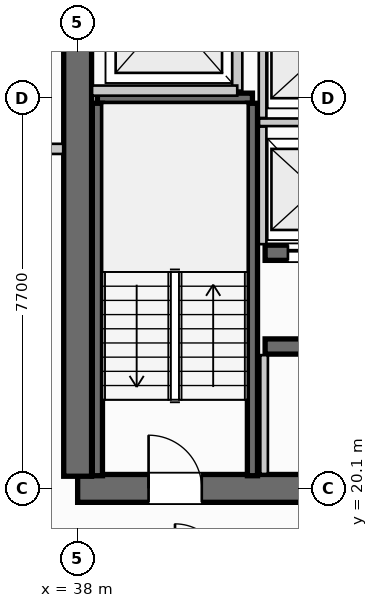
"""IFC4 building model, lengths in metres.
Left out: names, types, materials, properties, quantities, classifications, styles, units other than length and angle.
Written with IfcOpenShell. Run it as: python <this file> out.ifc"""

import sys

from ifc_helpers import new_model, si_unit, direction, frame, frame_2d, origin, place, context, subcontext, project, spatial, rectangle, extrude, source, transform, mapped, element, fill, save


model = new_model("IFC4")
c1 = context("Model", 3, precision=1e-05, world=origin(), true_north=direction((0.0, 1.0)))
c2 = subcontext(c1, "Body", "Model", "MODEL_VIEW")
j1 = project(units=[si_unit("LENGTHUNIT", "METRE"), si_unit("PLANEANGLEUNIT", "RADIAN")], contexts=[c1])
p1 = place(None, origin())
s1 = spatial("IfcSite", under=j1, at=p1, CompositionType="ELEMENT")
p2 = place(p1, origin())
s2 = spatial("IfcBuilding", under=s1, at=p2, CompositionType="ELEMENT")
p3 = place(p2, frame((0.0, 0.0, 214.9)))
s3 = spatial("IfcBuildingStorey", under=s2, at=p3, CompositionType="ELEMENT", Elevation=214.9)
p4 = place(p3, frame((38.0, 20.1, 0.0), z_axis=(0.0, 0.0, 1.0), x_axis=(1.0, 0.0, 0.0)))
e1 = element("IfcWall", 1, at=p4, inside=s3, PredefinedType="SHEAR", context=c2, shape_type="SweptSolid", body=[
    extrude(rectangle(XDim=17.6, YDim=0.55, at=frame_2d((8.8, 0.0))), origin(), (0.0, 0.0, 1.0), 3.24),
])
p5 = place(p4, frame((1.4, 0.0, 0.0)))
e2 = element("IfcOpeningElement", 2, at=p5, cuts=e1, PredefinedType="OPENING", context=c2, shape_type="SweptSolid", body=[
    extrude(rectangle(XDim=1.05, YDim=2.15, at=frame_2d((0.525, 1.075))), frame((0.0, 0.285, 0.0), z_axis=(0.0, -1.0, 0.0), x_axis=(1.0, 0.0, 0.0)), (0.0, 0.0, 1.0), 0.57),
])
p6 = place(p4, frame((15.15, 0.0, 0.0)))
e3 = element("IfcOpeningElement", 3, at=p6, cuts=e1, PredefinedType="OPENING", context=c2, shape_type="SweptSolid", body=[
    extrude(rectangle(XDim=1.05, YDim=2.15, at=frame_2d((0.525, 1.075))), frame((0.0, 0.285, 0.0), z_axis=(0.0, -1.0, 0.0), x_axis=(1.0, 0.0, 0.0)), (0.0, 0.0, 1.0), 0.57),
])
p7 = place(p4, frame((5.25, 0.0, 0.0)))
e4 = element("IfcOpeningElement", 4, at=p7, cuts=e1, PredefinedType="OPENING", context=c2, shape_type="SweptSolid", body=[
    extrude(rectangle(XDim=0.9, YDim=2.15, at=frame_2d((0.45, 1.075))), frame((0.0, 0.285, 0.0), z_axis=(0.0, -1.0, 0.0), x_axis=(1.0, 0.0, 0.0)), (0.0, 0.0, 1.0), 0.57),
])
p8 = place(p4, frame((11.4, 0.0, 0.0)))
e5 = element("IfcOpeningElement", 5, at=p8, cuts=e1, PredefinedType="OPENING", context=c2, shape_type="SweptSolid", body=[
    extrude(rectangle(XDim=0.95, YDim=2.15, at=frame_2d((0.475, 1.075))), frame((0.0, 0.285, 0.0), z_axis=(0.0, -1.0, 0.0), x_axis=(1.0, 0.0, 0.0)), (0.0, 0.0, 1.0), 0.57),
])
p9 = place(p3, frame((38.0, 35.26, 0.0), z_axis=(0.0, 0.0, 1.0), x_axis=(0.0, -1.0, 0.0)))
e6 = element("IfcWall", 6, at=p9, inside=s3, PredefinedType="SHEAR", context=c2, shape_type="SweptSolid", body=[
    extrude(rectangle(XDim=14.92, YDim=0.55, at=frame_2d((7.46, 0.0))), origin(), (0.0, 0.0, 1.0), 3.24),
])
p10 = place(p9, frame((5.21, 0.0, 0.0)))
e7 = element("IfcOpeningElement", 7, at=p10, cuts=e6, PredefinedType="OPENING", context=c2, shape_type="SweptSolid", body=[
    extrude(rectangle(XDim=1.1, YDim=2.2, at=frame_2d((0.55, 1.1))), frame((0.0, 0.285, 0.0), z_axis=(0.0, -1.0, 0.0), x_axis=(1.0, 0.0, 0.0)), (0.0, 0.0, 1.0), 0.57),
])
p11 = place(p3, frame((41.7, 22.9, 0.0), z_axis=(0.0, 0.0, 1.0), x_axis=(1.0, 0.0, 0.0)))
e8 = element("IfcWall", 8, at=p11, inside=s3, PredefinedType="SHEAR", context=c2, shape_type="SweptSolid", body=[
    extrude(rectangle(XDim=4.25, YDim=0.3, at=frame_2d((2.125, 0.0))), origin(), (0.0, 0.0, 1.0), 3.24),
])
p12 = place(p3, frame((41.7, 24.75, 0.0), z_axis=(0.0, 0.0, 1.0), x_axis=(1.0, 0.0, 0.0)))
e9 = element("IfcWall", 9, at=p12, inside=s3, PredefinedType="SHEAR", context=c2, shape_type="SweptSolid", body=[
    extrude(rectangle(XDim=4.25, YDim=0.3, at=frame_2d((2.125, 0.0))), origin(), (0.0, 0.0, 1.0), 3.24),
])
p13 = place(p12, frame((0.45, 0.0, 0.0)))
e10 = element("IfcOpeningElement", 10, at=p13, cuts=e9, PredefinedType="OPENING", context=c2, shape_type="SweptSolid", body=[
    extrude(rectangle(XDim=1.1, YDim=2.2, at=frame_2d((0.55, 1.1))), frame((0.0, 0.16, 0.0), z_axis=(0.0, -1.0, 0.0), x_axis=(1.0, 0.0, 0.0)), (0.0, 0.0, 1.0), 0.32),
])
p14 = place(p12, frame((2.5, 0.0, 0.0)))
e11 = element("IfcOpeningElement", 11, at=p14, cuts=e9, PredefinedType="OPENING", context=c2, shape_type="SweptSolid", body=[
    extrude(rectangle(XDim=1.1, YDim=2.2, at=frame_2d((0.55, 1.1))), frame((0.0, 0.16, 0.0), z_axis=(0.0, -1.0, 0.0), x_axis=(1.0, 0.0, 0.0)), (0.0, 0.0, 1.0), 0.32),
])
p15 = place(p3, frame((38.39, 27.8, 0.0), z_axis=(0.0, 0.0, 1.0), x_axis=(1.0, 0.0, 0.0)))
e12 = element("IfcWall", 12, at=p15, inside=s3, PredefinedType="SHEAR", context=c2, shape_type="SweptSolid", body=[
    extrude(rectangle(XDim=3.06, YDim=0.2, at=frame_2d((1.53, 0.0))), origin(), (0.0, 0.0, 1.0), 3.24),
])
for number, where, z_axis, x_axis in (
    (13, (41.45, 27.7, 0.0), (0.0, 0.0, 1.0), (0.0, -1.0, 0.0)),
    (14, (38.39, 20.35, 0.0), (0.0, 0.0, 1.0), (0.0, 1.0, 0.0)),
):
    element("IfcWall", number, at=place(p3, frame(where, z_axis=z_axis, x_axis=x_axis)), inside=s3, PredefinedType="SHEAR", context=c2, shape_type="SweptSolid", body=[
        extrude(rectangle(XDim=7.35, YDim=0.2, at=frame_2d((3.675, 0.0))), origin(), (0.0, 0.0, 1.0), 3.24),
    ])
p16 = place(p3, frame((41.15, 27.95, 0.0), z_axis=(0.0, 0.0, 1.0), x_axis=(0.0, 1.0, 0.0)))
e15 = element("IfcWall", 15, at=p16, inside=s3, PredefinedType="PARTITIONING", context=c2, shape_type="SweptSolid", body=[
    extrude(rectangle(XDim=3.1, YDim=0.2, at=frame_2d((1.55, 0.0))), origin(), (0.0, 0.0, 1.0), 2.295),
])
p17 = place(p3, frame((38.285, 27.95, 0.0), z_axis=(0.0, 0.0, 1.0), x_axis=(1.0, 0.0, 0.0)))
e16 = element("IfcWall", 16, at=p17, inside=s3, PredefinedType="PARTITIONING", context=c2, shape_type="SweptSolid", body=[
    extrude(rectangle(XDim=2.865, YDim=0.2, at=frame_2d((1.433, 0.0))), origin(), (0.0, 0.0, 1.0), 2.295),
])
p18 = place(p3, frame((34.5, 26.8, 0.0), z_axis=(0.0, 0.0, 1.0), x_axis=(1.0, 0.0, 0.0)))
e17 = element("IfcWall", 17, at=p18, inside=s3, PredefinedType="PARTITIONING", context=c2, shape_type="SweptSolid", body=[
    extrude(rectangle(XDim=3.215, YDim=0.2, at=frame_2d((1.607, 0.0))), origin(), (0.0, 0.0, 1.0), 2.295),
])
p19 = place(p3, frame((41.68, 20.385, 0.0), z_axis=(0.0, 0.0, 1.0), x_axis=(0.0, 1.0, 0.0)))
e18 = element("IfcWall", 18, at=p19, inside=s3, PredefinedType="PARTITIONING", context=c2, shape_type="SweptSolid", body=[
    extrude(rectangle(XDim=2.345, YDim=0.15, at=frame_2d((1.172, 0.0))), origin(), (0.0, 0.0, 1.0), 2.295),
])
p20 = place(p3, frame((41.58, 27.325, 0.0), z_axis=(0.0, 0.0, 1.0), x_axis=(1.0, 0.0, 0.0)))
e19 = element("IfcWall", 19, at=p20, inside=s3, PredefinedType="PARTITIONING", context=c2, shape_type="SweptSolid", body=[
    extrude(rectangle(XDim=4.32, YDim=0.15, at=frame_2d((2.16, 0.0))), origin(), (0.0, 0.0, 1.0), 2.295),
])
p21 = place(p3, frame((41.65, 24.92, 0.0), z_axis=(0.0, 0.0, 1.0), x_axis=(0.0, 1.0, 0.0)))
e20 = element("IfcWall", 20, at=p21, inside=s3, PredefinedType="PARTITIONING", context=c2, shape_type="SweptSolid", body=[
    extrude(rectangle(XDim=2.32, YDim=0.15, at=frame_2d((1.16, 0.0))), origin(), (0.0, 0.0, 1.0), 2.295),
])
p22 = place(p3, frame((41.65, 27.41, 0.0), z_axis=(0.0, 0.0, 1.0), x_axis=(0.0, 1.0, 0.0)))
e21 = element("IfcWall", 21, at=p22, inside=s3, PredefinedType="PARTITIONING", context=c2, shape_type="SweptSolid", body=[
    extrude(rectangle(XDim=2.27, YDim=0.15, at=frame_2d((1.135, 0.0))), origin(), (0.0, 0.0, 1.0), 2.295),
])
m1 = source(origin(), c2, "Body", "SweptSolid", [
    extrude(rectangle(XDim=1.05, YDim=2.15, at=frame_2d((0.525, 1.075))), frame((0.0, 0.025, 0.0), z_axis=(0.0, -1.0, 0.0), x_axis=(1.0, 0.0, 0.0)), (0.0, 0.0, 1.0), 0.05),
])
p23 = place(p5, origin())
e22 = element("IfcDoor", 22, at=p23, inside=s3, OperationType="SINGLE_SWING_LEFT", PredefinedType="DOOR", context=c2, shape_type="MappedRepresentation", body=[
    mapped(m1, transform((0.0, 0.0, 0.0), scale=1.0)),
])
fill(e2, e22)
m2 = source(origin(), c2, "Body", "SweptSolid", [
    extrude(rectangle(XDim=1.1, YDim=2.2, at=frame_2d((0.55, 1.1))), frame((0.0, 0.025, 0.0), z_axis=(0.0, -1.0, 0.0), x_axis=(1.0, 0.0, 0.0)), (0.0, 0.0, 1.0), 0.05),
])
p24 = place(p13, origin())
e23 = element("IfcDoor", 23, at=p24, inside=s3, OperationType="SLIDING_TO_RIGHT", PredefinedType="DOOR", context=c2, shape_type="MappedRepresentation", body=[
    mapped(m2, transform((0.0, 0.0, 0.0), scale=1.0)),
])
fill(e10, e23)
save(model, sys.argv[1])
